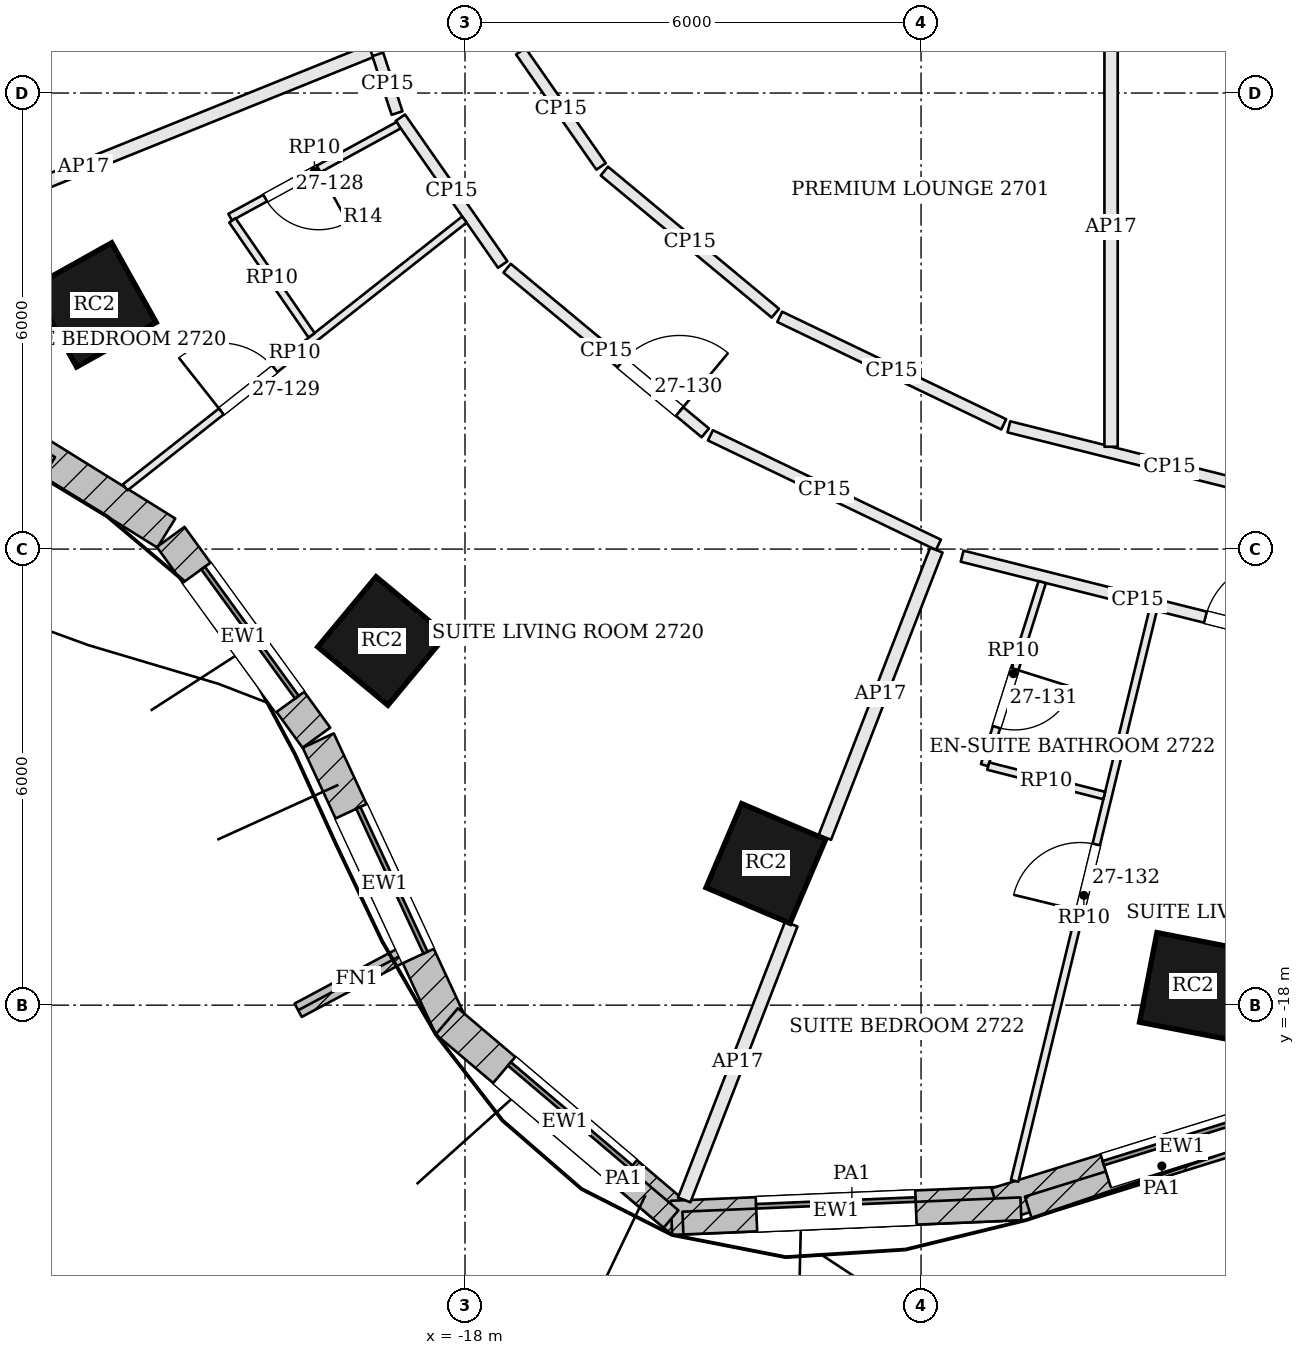
"""IFC4 building model, lengths in metres.
Left out: names, types, materials, properties, quantities, classifications, styles, units other than length and angle.
Written with IfcOpenShell. Run it as: python <this file> out.ifc"""

import sys

from ifc_helpers import new_model, si_unit, direction, frame, frame_2d, origin, origin_2d, place, context, subcontext, project, spatial, rectangle, extrude, element, fill, save


model = new_model("IFC4")
c1 = context("Model", 3, precision=1e-05, world=origin(), true_north=direction((0.0, 1.0)))
c2 = subcontext(c1, "Body", "Model", "MODEL_VIEW")
j1 = project(units=[si_unit("LENGTHUNIT", "METRE"), si_unit("PLANEANGLEUNIT", "RADIAN")], contexts=[c1])
p1 = place(None, origin())
s1 = spatial("IfcSite", under=j1, at=p1, CompositionType="ELEMENT")
p2 = place(p1, origin())
s2 = spatial("IfcBuilding", under=s1, at=p2, CompositionType="ELEMENT")
p3 = place(p2, frame((0.0, 0.0, 114.0)))
s3 = spatial("IfcBuildingStorey", under=s2, at=p3, CompositionType="ELEMENT", Elevation=114.0)
for number, where, z_axis, x_axis in (
    (1, (-22.879, -8.787, 0.0), (0.0, 0.0, 1.0), (0.489, -0.873, 0.0)),
    (2, (-19.092, -13.209, 0.0), (0.0, 0.0, 1.0), (0.769, -0.639, 0.0)),
    (3, (-14.042, -16.136, 0.0), (0.0, 0.0, 1.0), (0.92, -0.392, 0.0)),
    (4, (-8.422, -17.749, 0.0), (0.0, 0.0, 1.0), (0.982, -0.191, 0.0)),
):
    element("IfcColumn", number, at=place(p3, frame(where, z_axis=z_axis, x_axis=x_axis)), inside=s3, PredefinedType="COLUMN", context=c2, shape_type="SweptSolid", body=[
        extrude(rectangle(XDim=1.2, YDim=1.2, at=origin_2d()), origin(), (0.0, 0.0, 1.0), 3.6),
    ])
p4 = place(p3, frame((-27.016, -8.626, 0.0), z_axis=(0.0, 0.0, 1.0), x_axis=(0.849198377377, -0.528073968172, 0.0)))
e5 = element("IfcWall", 5, at=p4, inside=s3, PredefinedType="SOLIDWALL", context=c2, shape_type="SweptSolid", body=[
    extrude(rectangle(XDim=5.99, YDim=0.45, at=frame_2d((2.995, 0.0))), origin(), (0.0, 0.0, 1.0), 3.4),
])
p5 = place(p4, frame((1.945, 0.0, 0.9)))
e6 = element("IfcOpeningElement", 6, at=p5, cuts=e5, PredefinedType="OPENING", context=c2, shape_type="SweptSolid", body=[
    extrude(rectangle(XDim=2.1, YDim=2.0, at=frame_2d((1.05, 1.0))), frame((0.0, 0.235, 0.0), z_axis=(0.0, -1.0, 0.0), x_axis=(1.0, 0.0, 0.0)), (0.0, 0.0, 1.0), 0.47),
])
p6 = place(p3, frame((-21.872, -11.841, 0.0), z_axis=(0.0, 0.0, 1.0), x_axis=(0.587562050363, -0.809179113036, 0.0)))
e7 = element("IfcWall", 7, at=p6, inside=s3, PredefinedType="SOLIDWALL", context=c2, shape_type="SweptSolid", body=[
    extrude(rectangle(XDim=3.263, YDim=0.45, at=frame_2d((1.631, 0.0))), origin(), (0.0, 0.0, 1.0), 3.4),
])
p7 = place(p6, frame((0.582, 0.0, 0.9)))
e8 = element("IfcOpeningElement", 8, at=p7, cuts=e7, PredefinedType="OPENING", context=c2, shape_type="SweptSolid", body=[
    extrude(rectangle(XDim=2.1, YDim=2.0, at=frame_2d((1.05, 1.0))), frame((0.0, 0.235, 0.0), z_axis=(0.0, -1.0, 0.0), x_axis=(1.0, 0.0, 0.0)), (0.0, 0.0, 1.0), 0.47),
])
p8 = place(p3, frame((-19.931, -14.519, 0.0), z_axis=(0.0, 0.0, 1.0), x_axis=(0.421138964136, -0.906996126169, 0.0)))
e9 = element("IfcWall", 9, at=p8, inside=s3, PredefinedType="SOLIDWALL", context=c2, shape_type="SweptSolid", body=[
    extrude(rectangle(XDim=4.15, YDim=0.45, at=frame_2d((2.075, 0.0))), origin(), (0.0, 0.0, 1.0), 3.4),
])
p9 = place(p8, frame((1.025, 0.0, 0.9)))
e10 = element("IfcOpeningElement", 10, at=p9, cuts=e9, PredefinedType="OPENING", context=c2, shape_type="SweptSolid", body=[
    extrude(rectangle(XDim=2.1, YDim=2.0, at=frame_2d((1.05, 1.0))), frame((0.0, 0.235, 0.0), z_axis=(0.0, -1.0, 0.0), x_axis=(1.0, 0.0, 0.0)), (0.0, 0.0, 1.0), 0.47),
])
p10 = place(p3, frame((-18.238, -18.212, 0.0), z_axis=(0.0, 0.0, 1.0), x_axis=(0.762479604733, -0.647012250554, 0.0)))
e11 = element("IfcWall", 11, at=p10, inside=s3, PredefinedType="SOLIDWALL", context=c2, shape_type="SweptSolid", body=[
    extrude(rectangle(XDim=4.079, YDim=0.45, at=frame_2d((2.039, 0.0))), origin(), (0.0, 0.0, 1.0), 3.4),
])
p11 = place(p10, frame((0.99, 0.0, 0.9)))
e12 = element("IfcOpeningElement", 12, at=p11, cuts=e11, PredefinedType="OPENING", context=c2, shape_type="SweptSolid", body=[
    extrude(rectangle(XDim=2.1, YDim=2.0, at=frame_2d((1.05, 1.0))), frame((0.0, 0.235, 0.0), z_axis=(0.0, -1.0, 0.0), x_axis=(1.0, 0.0, 0.0)), (0.0, 0.0, 1.0), 0.47),
])
p12 = place(p3, frame((-15.283, -20.798, 0.0), z_axis=(0.0, 0.0, 1.0), x_axis=(0.999108814386, 0.042208731526, 0.0)))
e13 = element("IfcWall", 13, at=p12, inside=s3, PredefinedType="SOLIDWALL", context=c2, shape_type="SweptSolid", body=[
    extrude(rectangle(XDim=4.338, YDim=0.45, at=frame_2d((2.169, 0.0))), origin(), (0.0, 0.0, 1.0), 3.4),
])
p13 = place(p12, frame((1.119, 0.0, 0.9)))
e14 = element("IfcOpeningElement", 14, at=p13, cuts=e13, PredefinedType="OPENING", context=c2, shape_type="SweptSolid", body=[
    extrude(rectangle(XDim=2.1, YDim=2.0, at=frame_2d((1.05, 1.0))), frame((0.0, 0.235, 0.0), z_axis=(0.0, -1.0, 0.0), x_axis=(1.0, 0.0, 0.0)), (0.0, 0.0, 1.0), 0.47),
])
p14 = place(p3, frame((-11.007, -20.625, 0.0), z_axis=(0.0, 0.0, 1.0), x_axis=(0.954949254112, 0.296769139352, 0.0)))
e15 = element("IfcWall", 15, at=p14, inside=s3, PredefinedType="SOLIDWALL", context=c2, shape_type="SweptSolid", body=[
    extrude(rectangle(XDim=5.106, YDim=0.45, at=frame_2d((2.553, 0.0))), origin(), (0.0, 0.0, 1.0), 3.4),
])
p15 = place(p14, frame((1.503, 0.0, 0.9)))
e16 = element("IfcOpeningElement", 16, at=p15, cuts=e15, PredefinedType="OPENING", context=c2, shape_type="SweptSolid", body=[
    extrude(rectangle(XDim=2.1, YDim=2.0, at=frame_2d((1.05, 1.0))), frame((0.0, 0.235, 0.0), z_axis=(0.0, -1.0, 0.0), x_axis=(1.0, 0.0, 0.0)), (0.0, 0.0, 1.0), 0.47),
])
p16 = place(p3, frame((-18.651, -17.243, 0.0), z_axis=(0.0, 0.0, 1.0), x_axis=(-0.882225472329, -0.470827161466, 0.0)))
e17 = element("IfcWall", 17, at=p16, inside=s3, PredefinedType="SOLIDWALL", context=c2, shape_type="SweptSolid", body=[
    extrude(rectangle(XDim=1.75, YDim=0.2, at=frame_2d((0.875, 0.0))), origin(), (0.0, 0.0, 1.0), 3.4),
])
p17 = place(p3, frame((-26.965, -8.746, 3.6), z_axis=(0.0, 0.0, 1.0), x_axis=(0.849203312007, -0.528066032686, 0.0)))
e18 = element("IfcWall", 18, at=p17, inside=s3, PredefinedType="PARAPET", context=c2, shape_type="SweptSolid", body=[
    extrude(rectangle(XDim=4.113, YDim=0.3, at=frame_2d((2.056, 0.0))), origin(), (0.0, 0.0, 1.0), 1.1),
])
p18 = place(p3, frame((-16.542, -19.75, 3.6), z_axis=(0.0, 0.0, 1.0), x_axis=(0.762426907318, -0.647074347349, 0.0)))
e19 = element("IfcWall", 19, at=p18, inside=s3, PredefinedType="PARAPET", context=c2, shape_type="SweptSolid", body=[
    extrude(rectangle(XDim=1.642, YDim=0.3, at=frame_2d((0.821, 0.0))), origin(), (0.0, 0.0, 1.0), 1.1),
])
p19 = place(p3, frame((-15.133, -20.867, 3.6), z_axis=(0.0, 0.0, 1.0), x_axis=(0.999109914186, 0.042182690458, 0.0)))
e20 = element("IfcWall", 20, at=p19, inside=s3, PredefinedType="PARAPET", context=c2, shape_type="SweptSolid", body=[
    extrude(rectangle(XDim=4.451, YDim=0.3, at=frame_2d((2.225, 0.0))), origin(), (0.0, 0.0, 1.0), 1.1),
])
p20 = place(p3, frame((-10.59, -20.662, 3.6), z_axis=(0.0, 0.0, 1.0), x_axis=(0.954933257017, 0.296820610207, 0.0)))
e21 = element("IfcWall", 21, at=p20, inside=s3, PredefinedType="PARAPET", context=c2, shape_type="SweptSolid", body=[
    extrude(rectangle(XDim=3.681, YDim=0.3, at=frame_2d((1.84, 0.0))), origin(), (0.0, 0.0, 1.0), 1.1),
])
p21 = place(p3, frame((-26.795, -8.494, 0.0), z_axis=(0.0, 0.0, 1.0), x_axis=(0.927431243966, 0.373993700101, 0.0)))
e22 = element("IfcWall", 22, at=p21, inside=s3, PredefinedType="PARTITIONING", context=c2, shape_type="SweptSolid", body=[
    extrude(rectangle(XDim=8.146, YDim=0.175, at=frame_2d((4.073, 0.0))), origin(), (0.0, 0.0, 1.0), 2.784),
])
p22 = place(p3, frame((-19.148, -5.491, 0.0), z_axis=(0.0, 0.0, 1.0), x_axis=(0.312172640186, -0.950025390566, 0.0)))
e23 = element("IfcWall", 23, at=p22, inside=s3, PredefinedType="PARTITIONING", context=c2, shape_type="SweptSolid", body=[
    extrude(rectangle(XDim=0.813, YDim=0.15, at=frame_2d((0.407, 0.0))), origin(), (0.0, 0.0, 1.0), 2.784),
])
p23 = place(p3, frame((-18.851, -6.325, 0.0), z_axis=(0.0, 0.0, 1.0), x_axis=(0.572090775968, -0.820190309656, 0.0)))
e24 = element("IfcWall", 24, at=p23, inside=s3, PredefinedType="PARTITIONING", context=c2, shape_type="SweptSolid", body=[
    extrude(rectangle(XDim=2.355, YDim=0.15, at=frame_2d((1.177, 0.0))), origin(), (0.0, 0.0, 1.0), 2.784),
])
p24 = place(p3, frame((-17.446, -8.304, 0.0), z_axis=(0.0, 0.0, 1.0), x_axis=(0.769200174495, -0.639007896318, 0.0)))
e25 = element("IfcWall", 25, at=p24, inside=s3, PredefinedType="PARTITIONING", context=c2, shape_type="SweptSolid", body=[
    extrude(rectangle(XDim=3.39, YDim=0.15, at=frame_2d((1.695, 0.0))), origin(), (0.0, 0.0, 1.0), 2.784),
])
p25 = place(p24, frame((1.95, 0.0, 0.0)))
e26 = element("IfcOpeningElement", 26, at=p25, cuts=e25, PredefinedType="OPENING", context=c2, shape_type="SweptSolid", body=[
    extrude(rectangle(XDim=1.0, YDim=2.1, at=frame_2d((0.5, 1.05))), frame((0.0, 0.085, 0.0), z_axis=(0.0, -1.0, 0.0), x_axis=(1.0, 0.0, 0.0)), (0.0, 0.0, 1.0), 0.17),
])
p26 = place(p3, frame((-14.771, -10.503, 0.0), z_axis=(0.0, 0.0, 1.0), x_axis=(0.90150244617, -0.432774005169, 0.0)))
e27 = element("IfcWall", 27, at=p26, inside=s3, PredefinedType="PARTITIONING", context=c2, shape_type="SweptSolid", body=[
    extrude(rectangle(XDim=3.327, YDim=0.15, at=frame_2d((1.664, 0.0))), origin(), (0.0, 0.0, 1.0), 2.784),
])
p27 = place(p3, frame((-15.115, -20.562, 0.0), z_axis=(0.0, 0.0, 1.0), x_axis=(0.361692522346, 0.93229744142, 0.0)))
e28 = element("IfcWall", 28, at=p27, inside=s3, PredefinedType="PARTITIONING", context=c2, shape_type="SweptSolid", body=[
    extrude(rectangle(XDim=3.893, YDim=0.175, at=frame_2d((1.946, 0.0))), origin(), (0.0, 0.0, 1.0), 2.784),
])
p28 = place(p3, frame((-13.265, -15.793, 0.0), z_axis=(0.0, 0.0, 1.0), x_axis=(0.361745790375, 0.932276773896, 0.0)))
e29 = element("IfcWall", 29, at=p28, inside=s3, PredefinedType="PARTITIONING", context=c2, shape_type="SweptSolid", body=[
    extrude(rectangle(XDim=4.054, YDim=0.175, at=frame_2d((2.027, 0.0))), origin(), (0.0, 0.0, 1.0), 2.784),
])
p29 = place(p3, frame((-11.46, -12.093, 0.0), z_axis=(0.0, 0.0, 1.0), x_axis=(0.969988379079, -0.243151278945, 0.0)))
e30 = element("IfcWall", 30, at=p29, inside=s3, PredefinedType="PARTITIONING", context=c2, shape_type="SweptSolid", body=[
    extrude(rectangle(XDim=4.758, YDim=0.15, at=frame_2d((2.379, 0.0))), origin(), (0.0, 0.0, 1.0), 2.784),
])
p30 = place(p29, frame((3.3, 0.0, 0.0)))
e31 = element("IfcOpeningElement", 31, at=p30, cuts=e30, PredefinedType="OPENING", context=c2, shape_type="SweptSolid", body=[
    extrude(rectangle(XDim=1.0, YDim=2.1, at=frame_2d((0.5, 1.05))), frame((0.0, 0.085, 0.0), z_axis=(0.0, -1.0, 0.0), x_axis=(1.0, 0.0, 0.0)), (0.0, 0.0, 1.0), 0.17),
])
p31 = place(p3, frame((-6.617, -11.451, 0.0), z_axis=(0.0, 0.0, 1.0), x_axis=(-0.969987441267, 0.243155020069, 0.0)))
e32 = element("IfcWall", 32, at=p31, inside=s3, PredefinedType="PARTITIONING", context=c2, shape_type="SweptSolid", body=[
    extrude(rectangle(XDim=4.359, YDim=0.15, at=frame_2d((2.179, 0.0))), origin(), (0.0, 0.0, 1.0), 2.784),
])
p32 = place(p3, frame((-10.913, -10.359, 0.0), z_axis=(0.0, 0.0, 1.0), x_axis=(-0.90149741277, 0.432784489982, 0.0)))
e33 = element("IfcWall", 33, at=p32, inside=s3, PredefinedType="PARTITIONING", context=c2, shape_type="SweptSolid", body=[
    extrude(rectangle(XDim=3.269, YDim=0.15, at=frame_2d((1.634, 0.0))), origin(), (0.0, 0.0, 1.0), 2.784),
])
p33 = place(p3, frame((-13.917, -8.896, 0.0), z_axis=(0.0, 0.0, 1.0), x_axis=(-0.769130409479, 0.639091866021, 0.0)))
e34 = element("IfcWall", 34, at=p33, inside=s3, PredefinedType="PARTITIONING", context=c2, shape_type="SweptSolid", body=[
    extrude(rectangle(XDim=2.925, YDim=0.15, at=frame_2d((1.462, 0.0))), origin(), (0.0, 0.0, 1.0), 2.784),
])
p34 = place(p3, frame((-16.209, -6.966, 0.0), z_axis=(0.0, 0.0, 1.0), x_axis=(-0.572051367607, 0.820217795966, 0.0)))
e35 = element("IfcWall", 35, at=p34, inside=s3, PredefinedType="PARTITIONING", context=c2, shape_type="SweptSolid", body=[
    extrude(rectangle(XDim=1.848, YDim=0.15, at=frame_2d((0.924, 0.0))), origin(), (0.0, 0.0, 1.0), 2.784),
])
p35 = place(p3, frame((-22.47, -11.188, 0.0), z_axis=(0.0, 0.0, 1.0), x_axis=(0.784820113127, 0.619723640046, 0.0)))
e36 = element("IfcWall", 36, at=p35, inside=s3, PredefinedType="PARTITIONING", context=c2, shape_type="SweptSolid", body=[
    extrude(rectangle(XDim=5.686, YDim=0.1, at=frame_2d((2.843, 0.0))), origin(), (0.0, 0.0, 1.0), 2.884),
])
p36 = place(p35, frame((1.611, 0.0, 0.0)))
e37 = element("IfcOpeningElement", 37, at=p36, cuts=e36, PredefinedType="OPENING", context=c2, shape_type="SweptSolid", body=[
    extrude(rectangle(XDim=0.9, YDim=2.4, at=frame_2d((0.45, 1.2))), frame((0.0, 0.06, 0.0), z_axis=(0.0, -1.0, 0.0), x_axis=(1.0, 0.0, 0.0)), (0.0, 0.0, 1.0), 0.12),
])
p37 = place(p3, frame((-18.873, -6.424, 0.0), z_axis=(0.0, 0.0, 1.0), x_axis=(-0.87765527709, -0.479292410327, 0.0)))
e38 = element("IfcWall", 38, at=p37, inside=s3, PredefinedType="PARTITIONING", context=c2, shape_type="SweptSolid", body=[
    extrude(rectangle(XDim=2.525, YDim=0.1, at=frame_2d((1.262, 0.0))), origin(), (0.0, 0.0, 1.0), 2.884),
])
p38 = place(p37, frame((1.2, 0.0, 0.0)))
e39 = element("IfcOpeningElement", 39, at=p38, cuts=e38, PredefinedType="OPENING", context=c2, shape_type="SweptSolid", body=[
    extrude(rectangle(XDim=0.8, YDim=2.1, at=frame_2d((0.4, 1.05))), frame((0.0, 0.06, 0.0), z_axis=(0.0, -1.0, 0.0), x_axis=(1.0, 0.0, 0.0)), (0.0, 0.0, 1.0), 0.12),
])
p39 = place(p3, frame((-21.061, -7.675, 0.0), z_axis=(0.0, 0.0, 1.0), x_axis=(0.567329263658, -0.82349104828, 0.0)))
e40 = element("IfcWall", 40, at=p39, inside=s3, PredefinedType="PARTITIONING", context=c2, shape_type="SweptSolid", body=[
    extrude(rectangle(XDim=1.837, YDim=0.1, at=frame_2d((0.919, 0.0))), origin(), (0.0, 0.0, 1.0), 2.884),
])
p40 = place(p3, frame((-10.769, -20.311, 0.0), z_axis=(0.0, 0.0, 1.0), x_axis=(0.235780843646, 0.971806253206, 0.0)))
e41 = element("IfcWall", 41, at=p40, inside=s3, PredefinedType="PARTITIONING", context=c2, shape_type="SweptSolid", body=[
    extrude(rectangle(XDim=7.729, YDim=0.1, at=frame_2d((3.864, 0.0))), origin(), (0.0, 0.0, 1.0), 2.884),
])
p41 = place(p40, frame((3.654, 0.0, 0.0)))
e42 = element("IfcOpeningElement", 42, at=p41, cuts=e41, PredefinedType="OPENING", context=c2, shape_type="SweptSolid", body=[
    extrude(rectangle(XDim=0.9, YDim=2.4, at=frame_2d((0.45, 1.2))), frame((0.0, 0.06, 0.0), z_axis=(0.0, -1.0, 0.0), x_axis=(1.0, 0.0, 0.0)), (0.0, 0.0, 1.0), 0.12),
])
p42 = place(p3, frame((-10.406, -12.434, 0.0), z_axis=(0.0, 0.0, 1.0), x_axis=(-0.300404792704, -0.95381180561, 0.0)))
e43 = element("IfcWall", 43, at=p42, inside=s3, PredefinedType="PARTITIONING", context=c2, shape_type="SweptSolid", body=[
    extrude(rectangle(XDim=2.525, YDim=0.1, at=frame_2d((1.263, 0.0))), origin(), (0.0, 0.0, 1.0), 2.884),
])
p43 = place(p42, frame((1.2, 0.0, 0.0)))
e44 = element("IfcOpeningElement", 44, at=p43, cuts=e43, PredefinedType="OPENING", context=c2, shape_type="SweptSolid", body=[
    extrude(rectangle(XDim=0.8, YDim=2.1, at=frame_2d((0.4, 1.05))), frame((0.0, 0.06, 0.0), z_axis=(0.0, -1.0, 0.0), x_axis=(1.0, 0.0, 0.0)), (0.0, 0.0, 1.0), 0.12),
])
p44 = place(p3, frame((-11.116, -14.855, 0.0), z_axis=(0.0, 0.0, 1.0), x_axis=(0.969315873367, -0.245818505486, 0.0)))
e45 = element("IfcWall", 45, at=p44, inside=s3, PredefinedType="PARTITIONING", context=c2, shape_type="SweptSolid", body=[
    extrude(rectangle(XDim=1.574, YDim=0.1, at=frame_2d((0.787, 0.0))), origin(), (0.0, 0.0, 1.0), 2.884),
])
p45 = place(p3, frame((-9.5, -10.654, 0.0), z_axis=(0.0, 0.0, 1.0), x_axis=(0.0, 1.0, 0.0)))
e46 = element("IfcWall", 46, at=p45, inside=s3, PredefinedType="PARTITIONING", context=c2, shape_type="SweptSolid", body=[
    extrude(rectangle(XDim=5.779, YDim=0.175, at=frame_2d((2.889, 0.0))), origin(), (0.0, 0.0, 1.0), 2.784),
])
p46 = place(p7, origin())
e47 = element("IfcWindow", 47, at=p46, inside=s3, PartitioningType="SINGLE_PANEL", PredefinedType="WINDOW", context=c2, shape_type="SweptSolid", body=[
    extrude(rectangle(XDim=2.1, YDim=2.0, at=frame_2d((1.05, 1.0))), frame((0.0, 0.135, 0.0), z_axis=(0.0, -1.0, 0.0), x_axis=(1.0, 0.0, 0.0)), (0.0, 0.0, 1.0), 0.06),
])
fill(e8, e47)
p47 = place(p9, origin())
e48 = element("IfcWindow", 48, at=p47, inside=s3, PartitioningType="SINGLE_PANEL", PredefinedType="WINDOW", context=c2, shape_type="SweptSolid", body=[
    extrude(rectangle(XDim=2.1, YDim=2.0, at=frame_2d((1.05, 1.0))), frame((0.0, 0.135, 0.0), z_axis=(0.0, -1.0, 0.0), x_axis=(1.0, 0.0, 0.0)), (0.0, 0.0, 1.0), 0.06),
])
fill(e10, e48)
p48 = place(p11, origin())
e49 = element("IfcWindow", 49, at=p48, inside=s3, PartitioningType="SINGLE_PANEL", PredefinedType="WINDOW", context=c2, shape_type="SweptSolid", body=[
    extrude(rectangle(XDim=2.1, YDim=2.0, at=frame_2d((1.05, 1.0))), frame((0.0, 0.135, 0.0), z_axis=(0.0, -1.0, 0.0), x_axis=(1.0, 0.0, 0.0)), (0.0, 0.0, 1.0), 0.06),
])
fill(e12, e49)
p49 = place(p13, origin())
e50 = element("IfcWindow", 50, at=p49, inside=s3, PartitioningType="SINGLE_PANEL", PredefinedType="WINDOW", context=c2, shape_type="SweptSolid", body=[
    extrude(rectangle(XDim=2.1, YDim=2.0, at=frame_2d((1.05, 1.0))), frame((0.0, 0.135, 0.0), z_axis=(0.0, -1.0, 0.0), x_axis=(1.0, 0.0, 0.0)), (0.0, 0.0, 1.0), 0.06),
])
fill(e14, e50)
p50 = place(p15, origin())
e51 = element("IfcWindow", 51, at=p50, inside=s3, PartitioningType="SINGLE_PANEL", PredefinedType="WINDOW", context=c2, shape_type="SweptSolid", body=[
    extrude(rectangle(XDim=2.1, YDim=2.0, at=frame_2d((1.05, 1.0))), frame((0.0, 0.135, 0.0), z_axis=(0.0, -1.0, 0.0), x_axis=(1.0, 0.0, 0.0)), (0.0, 0.0, 1.0), 0.06),
])
fill(e16, e51)
p51 = place(p38, origin())
e52 = element("IfcDoor", 52, at=p51, inside=s3, OperationType="SINGLE_SWING_LEFT", PredefinedType="DOOR", context=c2, shape_type="SweptSolid", body=[
    extrude(rectangle(XDim=0.8, YDim=2.1, at=frame_2d((0.4, 1.05))), frame((0.0, 0.025, 0.0), z_axis=(0.0, -1.0, 0.0), x_axis=(1.0, 0.0, 0.0)), (0.0, 0.0, 1.0), 0.05),
])
fill(e39, e52)
p52 = place(p36, origin())
e53 = element("IfcDoor", 53, at=p52, inside=s3, OperationType="SINGLE_SWING_LEFT", PredefinedType="DOOR", context=c2, shape_type="SweptSolid", body=[
    extrude(rectangle(XDim=0.9, YDim=2.4, at=frame_2d((0.45, 1.2))), frame((0.0, 0.025, 0.0), z_axis=(0.0, -1.0, 0.0), x_axis=(1.0, 0.0, 0.0)), (0.0, 0.0, 1.0), 0.05),
])
fill(e37, e53)
p53 = place(p25, origin())
e54 = element("IfcDoor", 54, at=p53, inside=s3, OperationType="SINGLE_SWING_RIGHT", PredefinedType="DOOR", context=c2, shape_type="SweptSolid", body=[
    extrude(rectangle(XDim=1.0, YDim=2.1, at=frame_2d((0.5, 1.05))), frame((0.0, 0.025, 0.0), z_axis=(0.0, -1.0, 0.0), x_axis=(1.0, 0.0, 0.0)), (0.0, 0.0, 1.0), 0.05),
])
fill(e26, e54)
p54 = place(p43, origin())
e55 = element("IfcDoor", 55, at=p54, inside=s3, OperationType="SINGLE_SWING_LEFT", PredefinedType="DOOR", context=c2, shape_type="SweptSolid", body=[
    extrude(rectangle(XDim=0.8, YDim=2.1, at=frame_2d((0.4, 1.05))), frame((0.0, 0.025, 0.0), z_axis=(0.0, -1.0, 0.0), x_axis=(1.0, 0.0, 0.0)), (0.0, 0.0, 1.0), 0.05),
])
fill(e44, e55)
p55 = place(p41, origin())
e56 = element("IfcDoor", 56, at=p55, inside=s3, OperationType="SINGLE_SWING_LEFT", PredefinedType="DOOR", context=c2, shape_type="SweptSolid", body=[
    extrude(rectangle(XDim=0.9, YDim=2.4, at=frame_2d((0.45, 1.2))), frame((0.0, 0.025, 0.0), z_axis=(0.0, -1.0, 0.0), x_axis=(1.0, 0.0, 0.0)), (0.0, 0.0, 1.0), 0.05),
])
fill(e42, e56)
p56 = place(p30, origin())
e57 = element("IfcDoor", 57, at=p56, inside=s3, OperationType="SINGLE_SWING_RIGHT", PredefinedType="DOOR", context=c2, shape_type="SweptSolid", body=[
    extrude(rectangle(XDim=1.0, YDim=2.1, at=frame_2d((0.5, 1.05))), frame((0.0, 0.025, 0.0), z_axis=(0.0, -1.0, 0.0), x_axis=(1.0, 0.0, 0.0)), (0.0, 0.0, 1.0), 0.05),
])
fill(e31, e57)
save(model, sys.argv[1])
